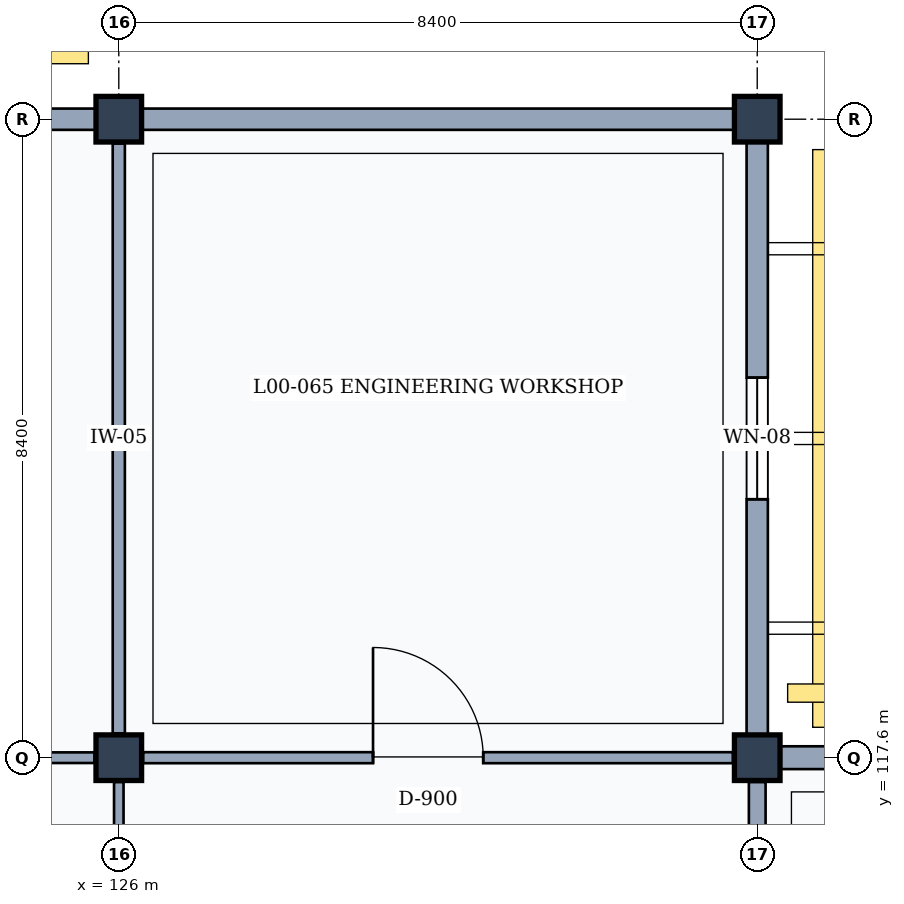
"""IFC4 building model, lengths in metres.
Left out: names, types, materials, properties, quantities, classifications, styles, units other than length and angle.
Written with IfcOpenShell. Run it as: python <this file> out.ifc"""

import sys

from ifc_helpers import new_model, si_unit, direction, frame, frame_2d, origin, origin_2d, place, context, subcontext, project, spatial, rectangle, extrude, element, fill, save


model = new_model("IFC4")
c1 = context("Model", 3, precision=1e-05, world=origin(), true_north=direction((0.0, 1.0)))
c2 = subcontext(c1, "Body", "Model", "MODEL_VIEW")
j1 = project(units=[si_unit("LENGTHUNIT", "METRE"), si_unit("PLANEANGLEUNIT", "RADIAN")], contexts=[c1])
p1 = place(None, origin())
s1 = spatial("IfcSite", under=j1, at=p1, CompositionType="ELEMENT")
p2 = place(p1, origin())
s2 = spatial("IfcBuilding", under=s1, at=p2, CompositionType="ELEMENT")
p3 = place(p2, origin())
s3 = spatial("IfcBuildingStorey", under=s2, at=p3, CompositionType="ELEMENT", Elevation=0.0)
for number, where, z_axis, x_axis in (
    (1, (126.0, 117.6, 0.0), (0.0, 0.0, 1.0), (1.0, 0.0, 0.0)),
    (2, (126.0, 126.0, 0.0), (0.0, 0.0, 1.0), (1.0, 0.0, 0.0)),
    (3, (134.4, 117.6, 0.0), (0.0, 0.0, 1.0), (1.0, 0.0, 0.0)),
    (4, (134.4, 126.0, 0.0), (0.0, 0.0, 1.0), (1.0, 0.0, 0.0)),
):
    element("IfcColumn", number, at=place(p3, frame(where, z_axis=z_axis, x_axis=x_axis)), inside=s3, PredefinedType="COLUMN", context=c2, shape_type="SweptSolid", body=[
        extrude(rectangle(XDim=0.6, YDim=0.6, at=origin_2d()), origin(), (0.0, 0.0, 1.0), 4.8),
    ])
p4 = place(p3, frame((117.9, 126.0, 0.0), z_axis=(0.0, 0.0, 1.0), x_axis=(1.0, 0.0, 0.0)))
e5 = element("IfcWall", 5, at=p4, inside=s3, PredefinedType="SOLIDWALL", context=c2, shape_type="SweptSolid", body=[
    extrude(rectangle(XDim=7.8, YDim=0.28, at=frame_2d((3.9, 0.0))), origin(), (0.0, 0.0, 1.0), 3.96),
])
p5 = place(p4, frame((3.3, 0.0, 0.95)))
e6 = element("IfcOpeningElement", 6, at=p5, cuts=e5, PredefinedType="OPENING", context=c2, shape_type="SweptSolid", body=[
    extrude(rectangle(XDim=1.2, YDim=1.8, at=frame_2d((0.6, 0.9))), frame((0.0, 0.15, 0.0), z_axis=(0.0, -1.0, 0.0), x_axis=(1.0, 0.0, 0.0)), (0.0, 0.0, 1.0), 0.3),
])
p6 = place(p3, frame((126.3, 126.0, 0.0), z_axis=(0.0, 0.0, 1.0), x_axis=(1.0, 0.0, 0.0)))
e7 = element("IfcWall", 7, at=p6, inside=s3, PredefinedType="SOLIDWALL", context=c2, shape_type="SweptSolid", body=[
    extrude(rectangle(XDim=7.8, YDim=0.28, at=frame_2d((3.9, 0.0))), origin(), (0.0, 0.0, 1.0), 3.96),
])
p7 = place(p3, frame((134.4, 125.7, 0.0), z_axis=(0.0, 0.0, 1.0), x_axis=(0.0, -1.0, 0.0)))
e8 = element("IfcWall", 8, at=p7, inside=s3, PredefinedType="SOLIDWALL", context=c2, shape_type="SweptSolid", body=[
    extrude(rectangle(XDim=7.8, YDim=0.28, at=frame_2d((3.9, 0.0))), origin(), (0.0, 0.0, 1.0), 3.96),
])
p8 = place(p7, frame((3.1, 0.0, 0.95)))
e9 = element("IfcOpeningElement", 9, at=p8, cuts=e8, PredefinedType="OPENING", context=c2, shape_type="SweptSolid", body=[
    extrude(rectangle(XDim=1.6, YDim=2.0, at=frame_2d((0.8, 1.0))), frame((0.0, 0.15, 0.0), z_axis=(0.0, -1.0, 0.0), x_axis=(1.0, 0.0, 0.0)), (0.0, 0.0, 1.0), 0.3),
])
p9 = place(p3, frame((134.7, 117.6, 0.0), z_axis=(0.0, 0.0, 1.0), x_axis=(1.0, 0.0, 0.0)))
e10 = element("IfcWall", 10, at=p9, inside=s3, PredefinedType="SOLIDWALL", context=c2, shape_type="SweptSolid", body=[
    extrude(rectangle(XDim=7.75, YDim=0.3, at=frame_2d((3.875, 0.0))), origin(), (0.0, 0.0, 1.0), 3.96),
])
p10 = place(p9, frame((2.375, 0.0, 0.95)))
e11 = element("IfcOpeningElement", 11, at=p10, cuts=e10, PredefinedType="OPENING", context=c2, shape_type="SweptSolid", body=[
    extrude(rectangle(XDim=3.0, YDim=1.8, at=frame_2d((1.5, 0.9))), frame((0.0, 0.16, 0.0), z_axis=(0.0, -1.0, 0.0), x_axis=(1.0, 0.0, 0.0)), (0.0, 0.0, 1.0), 0.32),
])
p11 = place(p3, frame((126.0, 109.52, 0.0), z_axis=(0.0, 0.0, 1.0), x_axis=(0.0, 1.0, 0.0)))
e12 = element("IfcWall", 12, at=p11, inside=s3, PredefinedType="PARTITIONING", context=c2, shape_type="SweptSolid", body=[
    extrude(rectangle(XDim=7.76, YDim=0.125, at=frame_2d((3.88, 0.0))), origin(), (0.0, 0.0, 1.0), 3.92),
])
p12 = place(p3, frame((117.92, 117.6, 0.0), z_axis=(0.0, 0.0, 1.0), x_axis=(1.0, 0.0, 0.0)))
e13 = element("IfcWall", 13, at=p12, inside=s3, PredefinedType="PARTITIONING", context=c2, shape_type="SweptSolid", body=[
    extrude(rectangle(XDim=7.76, YDim=0.14, at=frame_2d((3.88, 0.0))), origin(), (0.0, 0.0, 1.0), 3.92),
])
p13 = place(p12, frame((2.85, 0.0, 0.0)))
e14 = element("IfcOpeningElement", 14, at=p13, cuts=e13, PredefinedType="OPENING", context=c2, shape_type="SweptSolid", body=[
    extrude(rectangle(XDim=1.8, YDim=2.3, at=frame_2d((0.9, 1.15))), frame((0.0, 0.08, 0.0), z_axis=(0.0, -1.0, 0.0), x_axis=(1.0, 0.0, 0.0)), (0.0, 0.0, 1.0), 0.16),
])
p14 = place(p3, frame((126.0, 117.92, 0.0), z_axis=(0.0, 0.0, 1.0), x_axis=(0.0, 1.0, 0.0)))
e15 = element("IfcWall", 15, at=p14, inside=s3, PredefinedType="PARTITIONING", context=c2, shape_type="SweptSolid", body=[
    extrude(rectangle(XDim=7.76, YDim=0.16, at=frame_2d((3.88, 0.0))), origin(), (0.0, 0.0, 1.0), 3.92),
])
p15 = place(p3, frame((134.4, 109.52, 0.0), z_axis=(0.0, 0.0, 1.0), x_axis=(0.0, 1.0, 0.0)))
e16 = element("IfcWall", 16, at=p15, inside=s3, PredefinedType="PARTITIONING", context=c2, shape_type="SweptSolid", body=[
    extrude(rectangle(XDim=7.76, YDim=0.22, at=frame_2d((3.88, 0.0))), origin(), (0.0, 0.0, 1.0), 3.92),
])
p16 = place(p3, frame((126.32, 117.6, 0.0), z_axis=(0.0, 0.0, 1.0), x_axis=(1.0, 0.0, 0.0)))
e17 = element("IfcWall", 17, at=p16, inside=s3, PredefinedType="PARTITIONING", context=c2, shape_type="SweptSolid", body=[
    extrude(rectangle(XDim=7.76, YDim=0.145, at=frame_2d((3.88, 0.0))), origin(), (0.0, 0.0, 1.0), 3.92),
])
p17 = place(p16, frame((3.025, 0.0, 0.0)))
e18 = element("IfcOpeningElement", 18, at=p17, cuts=e17, PredefinedType="OPENING", context=c2, shape_type="SweptSolid", body=[
    extrude(rectangle(XDim=1.45, YDim=2.35, at=frame_2d((0.725, 1.175))), frame((0.0, 0.083, 0.0), z_axis=(0.0, -1.0, 0.0), x_axis=(1.0, 0.0, 0.0)), (0.0, 0.0, 1.0), 0.165),
])
p18 = place(p8, origin())
e19 = element("IfcWindow", 19, at=p18, inside=s3, PartitioningType="SINGLE_PANEL", PredefinedType="WINDOW", context=c2, shape_type="SweptSolid", body=[
    extrude(rectangle(XDim=1.6, YDim=2.0, at=frame_2d((0.8, 1.0))), frame((0.0, 0.03, 0.0), z_axis=(0.0, -1.0, 0.0), x_axis=(1.0, 0.0, 0.0)), (0.0, 0.0, 1.0), 0.06),
])
fill(e9, e19)
p19 = place(p17, origin())
e20 = element("IfcDoor", 20, at=p19, inside=s3, OperationType="SINGLE_SWING_LEFT", PredefinedType="DOOR", context=c2, shape_type="SweptSolid", body=[
    extrude(rectangle(XDim=1.45, YDim=2.35, at=frame_2d((0.725, 1.175))), frame((0.0, 0.025, 0.0), z_axis=(0.0, -1.0, 0.0), x_axis=(1.0, 0.0, 0.0)), (0.0, 0.0, 1.0), 0.05),
])
fill(e18, e20)
save(model, sys.argv[1])
